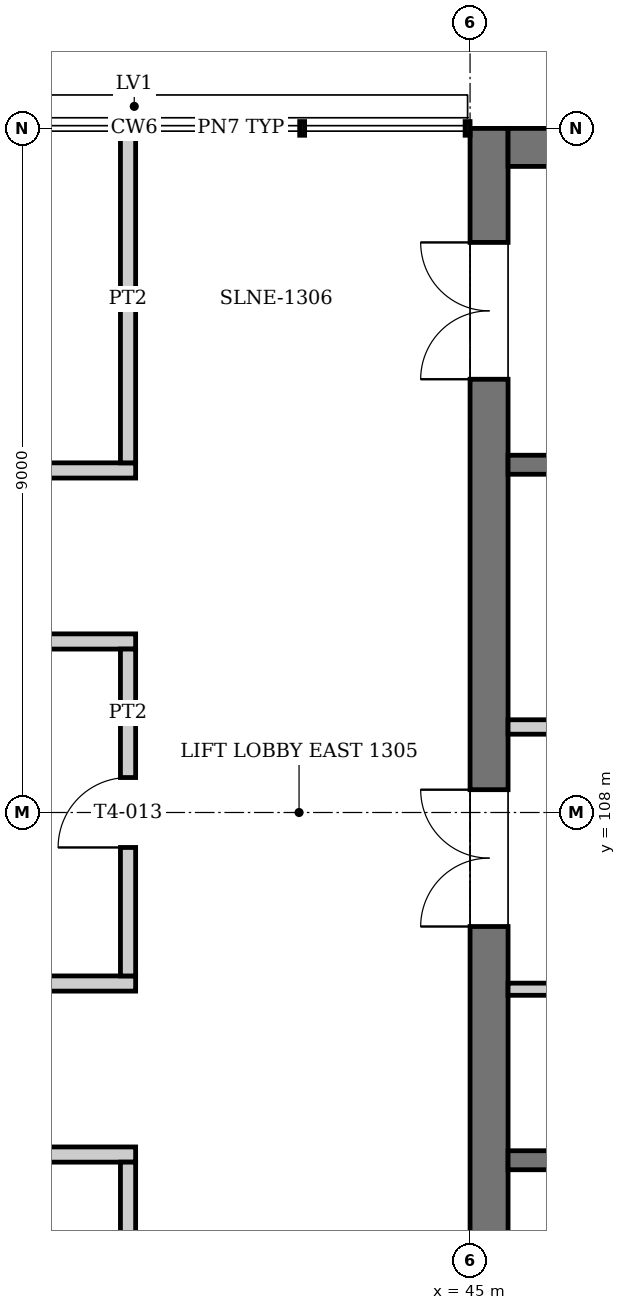
"""IFC4 building model, lengths in metres.
Left out: names, types, materials, properties, quantities, classifications, styles, units other than length and angle.
Written with IfcOpenShell. Run it as: python <this file> out.ifc"""

import sys

from ifc_helpers import new_model, si_unit, direction, frame, frame_2d, origin, place, context, subcontext, project, spatial, rectangle, extrude, element, fill, save


model = new_model("IFC4")
c1 = context("Model", 3, precision=1e-05, world=origin(), true_north=direction((0.0, 1.0)))
c2 = subcontext(c1, "Body", "Model", "MODEL_VIEW")
j1 = project(units=[si_unit("LENGTHUNIT", "METRE"), si_unit("PLANEANGLEUNIT", "RADIAN")], contexts=[c1])
p1 = place(None, origin())
s1 = spatial("IfcSite", under=j1, at=p1, CompositionType="ELEMENT")
p2 = place(p1, origin())
s2 = spatial("IfcBuilding", under=s1, at=p2, CompositionType="ELEMENT")
p3 = place(p2, frame((0.0, 0.0, 55.2)))
s3 = spatial("IfcBuildingStorey", under=s2, at=p3, CompositionType="ELEMENT", Elevation=55.2)
p4 = place(p3, frame((45.25, 99.0, 0.0), z_axis=(0.0, 0.0, 1.0), x_axis=(0.0, 1.0, 0.0)))
e1 = element("IfcWall", 1, at=p4, inside=s3, PredefinedType="SHEAR", context=c2, shape_type="SweptSolid", body=[
    extrude(rectangle(XDim=18.0, YDim=0.5, at=frame_2d((9.0, 0.0))), origin(), (0.0, 0.0, 1.0), 4.0),
])
p5 = place(p4, frame((1.5, 0.0, 0.0)))
e2 = element("IfcOpeningElement", 2, at=p5, cuts=e1, PredefinedType="OPENING", context=c2, shape_type="SweptSolid", body=[
    extrude(rectangle(XDim=1.8, YDim=2.1, at=frame_2d((0.9, 1.05))), frame((0.0, 0.26, 0.0), z_axis=(0.0, -1.0, 0.0), x_axis=(1.0, 0.0, 0.0)), (0.0, 0.0, 1.0), 0.52),
])
p6 = place(p4, frame((14.7, 0.0, 0.0)))
e3 = element("IfcOpeningElement", 3, at=p6, cuts=e1, PredefinedType="OPENING", context=c2, shape_type="SweptSolid", body=[
    extrude(rectangle(XDim=1.8, YDim=2.1, at=frame_2d((0.9, 1.05))), frame((0.0, 0.26, 0.0), z_axis=(0.0, -1.0, 0.0), x_axis=(1.0, 0.0, 0.0)), (0.0, 0.0, 1.0), 0.52),
])
p7 = place(p4, frame((7.5, 0.0, 0.0)))
e4 = element("IfcOpeningElement", 4, at=p7, cuts=e1, PredefinedType="OPENING", context=c2, shape_type="SweptSolid", body=[
    extrude(rectangle(XDim=1.8, YDim=2.1, at=frame_2d((0.9, 1.05))), frame((0.0, 0.26, 0.0), z_axis=(0.0, -1.0, 0.0), x_axis=(1.0, 0.0, 0.0)), (0.0, 0.0, 1.0), 0.52),
])
p8 = place(p3, frame((45.5, 116.75, 0.0), z_axis=(0.0, 0.0, 1.0), x_axis=(1.0, 0.0, 0.0)))
e5 = element("IfcWall", 5, at=p8, inside=s3, PredefinedType="SHEAR", context=c2, shape_type="SweptSolid", body=[
    extrude(rectangle(XDim=8.0, YDim=0.5, at=frame_2d((4.0, 0.0))), origin(), (0.0, 0.0, 1.0), 4.0),
])
for number, where, z_axis, x_axis in (
    (6, (45.5, 103.425, 0.0), (0.0, 0.0, 1.0), (1.0, 0.0, 0.0)),
    (7, (45.5, 112.575, 0.0), (0.0, 0.0, 1.0), (1.0, 0.0, 0.0)),
):
    element("IfcWall", number, at=place(p3, frame(where, z_axis=z_axis, x_axis=x_axis)), inside=s3, PredefinedType="SOLIDWALL", context=c2, shape_type="SweptSolid", body=[
        extrude(rectangle(XDim=8.0, YDim=0.25, at=frame_2d((4.0, 0.0))), origin(), (0.0, 0.0, 1.0), 3.75),
    ])
p9 = place(p3, frame((45.5, 105.675, 0.0), z_axis=(0.0, 0.0, 1.0), x_axis=(1.0, 0.0, 0.0)))
e8 = element("IfcWall", 8, at=p9, inside=s3, PredefinedType="PARTITIONING", context=c2, shape_type="SweptSolid", body=[
    extrude(rectangle(XDim=2.6, YDim=0.16, at=frame_2d((1.3, 0.0))), origin(), (0.0, 0.0, 1.0), 3.75),
])
p10 = place(p9, frame((0.7, 0.0, 0.0)))
e9 = element("IfcOpeningElement", 9, at=p10, cuts=e8, PredefinedType="OPENING", context=c2, shape_type="SweptSolid", body=[
    extrude(rectangle(XDim=1.2, YDim=2.1, at=frame_2d((0.6, 1.05))), frame((0.0, 0.09, 0.0), z_axis=(0.0, -1.0, 0.0), x_axis=(1.0, 0.0, 0.0)), (0.0, 0.0, 1.0), 0.18),
])
p11 = place(p3, frame((45.5, 109.125, 0.0), z_axis=(0.0, 0.0, 1.0), x_axis=(1.0, 0.0, 0.0)))
e10 = element("IfcWall", 10, at=p11, inside=s3, PredefinedType="PARTITIONING", context=c2, shape_type="SweptSolid", body=[
    extrude(rectangle(XDim=2.6, YDim=0.19, at=frame_2d((1.3, 0.0))), origin(), (0.0, 0.0, 1.0), 3.75),
])
p12 = place(p11, frame((0.84, 0.0, 0.0)))
e11 = element("IfcOpeningElement", 11, at=p12, cuts=e10, PredefinedType="OPENING", context=c2, shape_type="SweptSolid", body=[
    extrude(rectangle(XDim=0.92, YDim=2.1, at=frame_2d((0.46, 1.05))), frame((0.0, 0.105, 0.0), z_axis=(0.0, -1.0, 0.0), x_axis=(1.0, 0.0, 0.0)), (0.0, 0.0, 1.0), 0.21),
])
p13 = place(p3, frame((13.4, 103.5, 0.0), z_axis=(0.0, 0.0, 1.0), x_axis=(1.0, 0.0, 0.0)))
e12 = element("IfcWall", 12, at=p13, inside=s3, PredefinedType="PARTITIONING", context=c2, shape_type="SweptSolid", body=[
    extrude(rectangle(XDim=27.2, YDim=0.2, at=frame_2d((13.6, 0.0))), origin(), (0.0, 0.0, 1.0), 3.05),
])
p14 = place(p13, frame((1.85, 0.0, 0.0)))
e13 = element("IfcOpeningElement", 13, at=p14, cuts=e12, PredefinedType="OPENING", context=c2, shape_type="SweptSolid", body=[
    extrude(rectangle(XDim=1.0, YDim=2.1, at=frame_2d((0.5, 1.05))), frame((0.0, 0.11, 0.0), z_axis=(0.0, -1.0, 0.0), x_axis=(1.0, 0.0, 0.0)), (0.0, 0.0, 1.0), 0.22),
])
p15 = place(p13, frame((6.35, 0.0, 0.0)))
e14 = element("IfcOpeningElement", 14, at=p15, cuts=e12, PredefinedType="OPENING", context=c2, shape_type="SweptSolid", body=[
    extrude(rectangle(XDim=1.0, YDim=2.1, at=frame_2d((0.5, 1.05))), frame((0.0, 0.11, 0.0), z_axis=(0.0, -1.0, 0.0), x_axis=(1.0, 0.0, 0.0)), (0.0, 0.0, 1.0), 0.22),
])
p16 = place(p13, frame((10.85, 0.0, 0.0)))
e15 = element("IfcOpeningElement", 15, at=p16, cuts=e12, PredefinedType="OPENING", context=c2, shape_type="SweptSolid", body=[
    extrude(rectangle(XDim=1.0, YDim=2.1, at=frame_2d((0.5, 1.05))), frame((0.0, 0.11, 0.0), z_axis=(0.0, -1.0, 0.0), x_axis=(1.0, 0.0, 0.0)), (0.0, 0.0, 1.0), 0.22),
])
p17 = place(p13, frame((15.35, 0.0, 0.0)))
e16 = element("IfcOpeningElement", 16, at=p17, cuts=e12, PredefinedType="OPENING", context=c2, shape_type="SweptSolid", body=[
    extrude(rectangle(XDim=1.0, YDim=2.1, at=frame_2d((0.5, 1.05))), frame((0.0, 0.11, 0.0), z_axis=(0.0, -1.0, 0.0), x_axis=(1.0, 0.0, 0.0)), (0.0, 0.0, 1.0), 0.22),
])
p18 = place(p13, frame((19.85, 0.0, 0.0)))
e17 = element("IfcOpeningElement", 17, at=p18, cuts=e12, PredefinedType="OPENING", context=c2, shape_type="SweptSolid", body=[
    extrude(rectangle(XDim=1.0, YDim=2.1, at=frame_2d((0.5, 1.05))), frame((0.0, 0.11, 0.0), z_axis=(0.0, -1.0, 0.0), x_axis=(1.0, 0.0, 0.0)), (0.0, 0.0, 1.0), 0.22),
])
p19 = place(p13, frame((24.45, 0.0, 0.0)))
e18 = element("IfcOpeningElement", 18, at=p19, cuts=e12, PredefinedType="OPENING", context=c2, shape_type="SweptSolid", body=[
    extrude(rectangle(XDim=0.8, YDim=2.1, at=frame_2d((0.4, 1.05))), frame((0.0, 0.11, 0.0), z_axis=(0.0, -1.0, 0.0), x_axis=(1.0, 0.0, 0.0)), (0.0, 0.0, 1.0), 0.22),
])
p20 = place(p3, frame((13.4, 105.75, 0.0), z_axis=(0.0, 0.0, 1.0), x_axis=(1.0, 0.0, 0.0)))
e19 = element("IfcWall", 19, at=p20, inside=s3, PredefinedType="PARTITIONING", context=c2, shape_type="SweptSolid", body=[
    extrude(rectangle(XDim=27.2, YDim=0.2, at=frame_2d((13.6, 0.0))), origin(), (0.0, 0.0, 1.0), 3.05),
])
p21 = place(p20, frame((12.9, 0.0, 0.0)))
e20 = element("IfcOpeningElement", 20, at=p21, cuts=e19, PredefinedType="OPENING", context=c2, shape_type="SweptSolid", body=[
    extrude(rectangle(XDim=1.4, YDim=2.1, at=frame_2d((0.7, 1.05))), frame((0.0, 0.11, 0.0), z_axis=(0.0, -1.0, 0.0), x_axis=(1.0, 0.0, 0.0)), (0.0, 0.0, 1.0), 0.22),
])
p22 = place(p3, frame((13.4, 110.25, 0.0), z_axis=(0.0, 0.0, 1.0), x_axis=(1.0, 0.0, 0.0)))
e21 = element("IfcWall", 21, at=p22, inside=s3, PredefinedType="PARTITIONING", context=c2, shape_type="SweptSolid", body=[
    extrude(rectangle(XDim=27.2, YDim=0.2, at=frame_2d((13.6, 0.0))), origin(), (0.0, 0.0, 1.0), 3.05),
])
p23 = place(p22, frame((12.9, 0.0, 0.0)))
e22 = element("IfcOpeningElement", 22, at=p23, cuts=e21, PredefinedType="OPENING", context=c2, shape_type="SweptSolid", body=[
    extrude(rectangle(XDim=1.4, YDim=2.1, at=frame_2d((0.7, 1.05))), frame((0.0, 0.11, 0.0), z_axis=(0.0, -1.0, 0.0), x_axis=(1.0, 0.0, 0.0)), (0.0, 0.0, 1.0), 0.22),
])
p24 = place(p3, frame((18.08, 112.5, 0.0), z_axis=(0.0, 0.0, 1.0), x_axis=(1.0, 0.0, 0.0)))
e23 = element("IfcWall", 23, at=p24, inside=s3, PredefinedType="PARTITIONING", context=c2, shape_type="SweptSolid", body=[
    extrude(rectangle(XDim=22.52, YDim=0.2, at=frame_2d((11.26, 0.0))), origin(), (0.0, 0.0, 1.0), 3.05),
])
p25 = place(p24, frame((1.67, 0.0, 0.0)))
e24 = element("IfcOpeningElement", 24, at=p25, cuts=e23, PredefinedType="OPENING", context=c2, shape_type="SweptSolid", body=[
    extrude(rectangle(XDim=1.0, YDim=2.1, at=frame_2d((0.5, 1.05))), frame((0.0, 0.11, 0.0), z_axis=(0.0, -1.0, 0.0), x_axis=(1.0, 0.0, 0.0)), (0.0, 0.0, 1.0), 0.22),
])
p26 = place(p24, frame((6.17, 0.0, 0.0)))
e25 = element("IfcOpeningElement", 25, at=p26, cuts=e23, PredefinedType="OPENING", context=c2, shape_type="SweptSolid", body=[
    extrude(rectangle(XDim=1.0, YDim=2.1, at=frame_2d((0.5, 1.05))), frame((0.0, 0.11, 0.0), z_axis=(0.0, -1.0, 0.0), x_axis=(1.0, 0.0, 0.0)), (0.0, 0.0, 1.0), 0.22),
])
p27 = place(p24, frame((10.67, 0.0, 0.0)))
e26 = element("IfcOpeningElement", 26, at=p27, cuts=e23, PredefinedType="OPENING", context=c2, shape_type="SweptSolid", body=[
    extrude(rectangle(XDim=1.0, YDim=2.1, at=frame_2d((0.5, 1.05))), frame((0.0, 0.11, 0.0), z_axis=(0.0, -1.0, 0.0), x_axis=(1.0, 0.0, 0.0)), (0.0, 0.0, 1.0), 0.22),
])
p28 = place(p24, frame((15.17, 0.0, 0.0)))
e27 = element("IfcOpeningElement", 27, at=p28, cuts=e23, PredefinedType="OPENING", context=c2, shape_type="SweptSolid", body=[
    extrude(rectangle(XDim=1.0, YDim=2.1, at=frame_2d((0.5, 1.05))), frame((0.0, 0.11, 0.0), z_axis=(0.0, -1.0, 0.0), x_axis=(1.0, 0.0, 0.0)), (0.0, 0.0, 1.0), 0.22),
])
p29 = place(p24, frame((19.77, 0.0, 0.0)))
e28 = element("IfcOpeningElement", 28, at=p29, cuts=e23, PredefinedType="OPENING", context=c2, shape_type="SweptSolid", body=[
    extrude(rectangle(XDim=0.8, YDim=2.1, at=frame_2d((0.4, 1.05))), frame((0.0, 0.11, 0.0), z_axis=(0.0, -1.0, 0.0), x_axis=(1.0, 0.0, 0.0)), (0.0, 0.0, 1.0), 0.22),
])
p30 = place(p3, frame((40.5, 99.075, 0.0), z_axis=(0.0, 0.0, 1.0), x_axis=(0.0, 1.0, 0.0)))
e29 = element("IfcWall", 29, at=p30, inside=s3, PredefinedType="PARTITIONING", context=c2, shape_type="SweptSolid", body=[
    extrude(rectangle(XDim=4.325, YDim=0.2, at=frame_2d((2.163, 0.0))), origin(), (0.0, 0.0, 1.0), 3.05),
])
p31 = place(p3, frame((40.5, 105.85, 0.0), z_axis=(0.0, 0.0, 1.0), x_axis=(0.0, 1.0, 0.0)))
e30 = element("IfcWall", 30, at=p31, inside=s3, PredefinedType="PARTITIONING", context=c2, shape_type="SweptSolid", body=[
    extrude(rectangle(XDim=4.3, YDim=0.2, at=frame_2d((2.15, 0.0))), origin(), (0.0, 0.0, 1.0), 3.05),
])
p32 = place(p31, frame((1.69, 0.0, 0.0)))
e31 = element("IfcOpeningElement", 31, at=p32, cuts=e30, PredefinedType="OPENING", context=c2, shape_type="SweptSolid", body=[
    extrude(rectangle(XDim=0.92, YDim=2.1, at=frame_2d((0.46, 1.05))), frame((0.0, 0.11, 0.0), z_axis=(0.0, -1.0, 0.0), x_axis=(1.0, 0.0, 0.0)), (0.0, 0.0, 1.0), 0.22),
])
p33 = place(p3, frame((40.5, 112.6, 0.0), z_axis=(0.0, 0.0, 1.0), x_axis=(0.0, 1.0, 0.0)))
e32 = element("IfcWall", 32, at=p33, inside=s3, PredefinedType="PARTITIONING", context=c2, shape_type="SweptSolid", body=[
    extrude(rectangle(XDim=4.31, YDim=0.2, at=frame_2d((2.155, 0.0))), origin(), (0.0, 0.0, 1.0), 3.05),
])
p34 = place(p32, origin())
e33 = element("IfcDoor", 33, at=p34, inside=s3, OperationType="SINGLE_SWING_LEFT", PredefinedType="DOOR", context=c2, shape_type="SweptSolid", body=[
    extrude(rectangle(XDim=0.92, YDim=2.1, at=frame_2d((0.46, 1.05))), frame((0.0, 0.025, 0.0), z_axis=(0.0, -1.0, 0.0), x_axis=(1.0, 0.0, 0.0)), (0.0, 0.0, 1.0), 0.05),
])
fill(e31, e33)
p35 = place(p6, origin())
e34 = element("IfcDoor", 34, at=p35, inside=s3, OperationType="DOUBLE_DOOR_SINGLE_SWING", PredefinedType="DOOR", context=c2, shape_type="SweptSolid", body=[
    extrude(rectangle(XDim=1.8, YDim=2.1, at=frame_2d((0.9, 1.05))), frame((0.0, 0.025, 0.0), z_axis=(0.0, -1.0, 0.0), x_axis=(1.0, 0.0, 0.0)), (0.0, 0.0, 1.0), 0.05),
])
fill(e3, e34)
p36 = place(p7, origin())
e35 = element("IfcDoor", 35, at=p36, inside=s3, OperationType="DOUBLE_DOOR_SINGLE_SWING", PredefinedType="DOOR", context=c2, shape_type="SweptSolid", body=[
    extrude(rectangle(XDim=1.8, YDim=2.1, at=frame_2d((0.9, 1.05))), frame((0.0, 0.025, 0.0), z_axis=(0.0, -1.0, 0.0), x_axis=(1.0, 0.0, 0.0)), (0.0, 0.0, 1.0), 0.05),
])
fill(e4, e35)
save(model, sys.argv[1])
